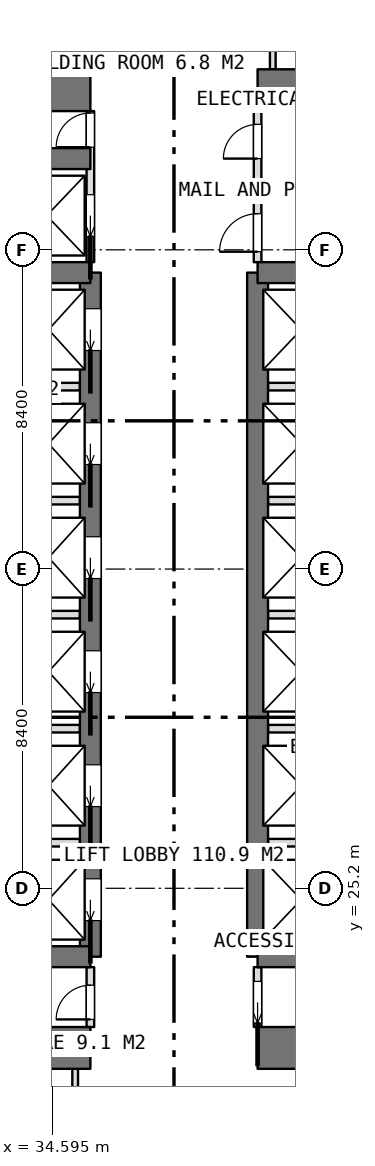
"""IFC4 building model, lengths in metres.
Left out: names, types, materials, properties, quantities, classifications, styles, units other than length and angle.
Written with IfcOpenShell. Run it as: python <this file> out.ifc"""

import sys

from ifc_helpers import new_model, si_unit, direction, frame, frame_2d, origin, place, context, subcontext, project, spatial, rectangle, extrude, element, fill, save


model = new_model("IFC4")
c1 = context("Model", 3, precision=1e-05, world=origin(), true_north=direction((0.0, 1.0)))
c2 = subcontext(c1, "Body", "Model", "MODEL_VIEW")
j1 = project(units=[si_unit("LENGTHUNIT", "METRE"), si_unit("PLANEANGLEUNIT", "RADIAN")], contexts=[c1])
p1 = place(None, origin())
s1 = spatial("IfcSite", under=j1, at=p1, CompositionType="ELEMENT")
p2 = place(p1, origin())
s2 = spatial("IfcBuilding", under=s1, at=p2, CompositionType="ELEMENT")
p3 = place(p2, frame((0.0, 0.0, 29.15)))
s3 = spatial("IfcBuildingStorey", under=s2, at=p3, CompositionType="ELEMENT", Elevation=29.15)
p4 = place(p3, frame((25.2, 21.0, 0.0), z_axis=(0.0, 0.0, 1.0), x_axis=(1.0, 0.0, 0.0)))
e1 = element("IfcWall", 1, at=p4, inside=s3, PredefinedType="SHEAR", context=c2, shape_type="SweptSolid", body=[
    extrude(rectangle(XDim=10.4, YDim=1.1, at=frame_2d((5.2, 0.0))), origin(), (0.0, 0.0, 1.0), 3.75),
])
p5 = place(p3, frame((40.0, 21.0, 0.0), z_axis=(0.0, 0.0, 1.0), x_axis=(1.0, 0.0, 0.0)))
e2 = element("IfcWall", 2, at=p5, inside=s3, PredefinedType="SHEAR", context=c2, shape_type="SweptSolid", body=[
    extrude(rectangle(XDim=10.4, YDim=1.1, at=frame_2d((5.2, 0.0))), origin(), (0.0, 0.0, 1.0), 3.75),
])
p6 = place(p3, frame((25.2, 46.2, 0.0), z_axis=(0.0, 0.0, 1.0), x_axis=(1.0, 0.0, 0.0)))
e3 = element("IfcWall", 3, at=p6, inside=s3, PredefinedType="SHEAR", context=c2, shape_type="SweptSolid", body=[
    extrude(rectangle(XDim=10.4, YDim=1.1, at=frame_2d((5.2, 0.0))), origin(), (0.0, 0.0, 1.0), 3.75),
])
p7 = place(p3, frame((40.0, 46.2, 0.0), z_axis=(0.0, 0.0, 1.0), x_axis=(1.0, 0.0, 0.0)))
e4 = element("IfcWall", 4, at=p7, inside=s3, PredefinedType="SHEAR", context=c2, shape_type="SweptSolid", body=[
    extrude(rectangle(XDim=10.4, YDim=1.1, at=frame_2d((5.2, 0.0))), origin(), (0.0, 0.0, 1.0), 3.75),
])
p8 = place(p3, frame((35.6, 23.4, 0.0), z_axis=(0.0, 0.0, 1.0), x_axis=(0.0, 1.0, 0.0)))
e5 = element("IfcWall", 5, at=p8, inside=s3, PredefinedType="SHEAR", context=c2, shape_type="SweptSolid", body=[
    extrude(rectangle(XDim=18.0, YDim=0.55, at=frame_2d((9.0, 0.0))), origin(), (0.0, 0.0, 1.0), 3.75),
])
p9 = place(p8, frame((0.95, 0.0, 0.0)))
e6 = element("IfcOpeningElement", 6, at=p9, cuts=e5, PredefinedType="OPENING", context=c2, shape_type="SweptSolid", body=[
    extrude(rectangle(XDim=1.1, YDim=2.1, at=frame_2d((0.55, 1.05))), frame((0.0, 0.285, 0.0), z_axis=(0.0, -1.0, 0.0), x_axis=(1.0, 0.0, 0.0)), (0.0, 0.0, 1.0), 0.57),
])
p10 = place(p8, frame((3.95, 0.0, 0.0)))
e7 = element("IfcOpeningElement", 7, at=p10, cuts=e5, PredefinedType="OPENING", context=c2, shape_type="SweptSolid", body=[
    extrude(rectangle(XDim=1.1, YDim=2.1, at=frame_2d((0.55, 1.05))), frame((0.0, 0.285, 0.0), z_axis=(0.0, -1.0, 0.0), x_axis=(1.0, 0.0, 0.0)), (0.0, 0.0, 1.0), 0.57),
])
p11 = place(p8, frame((6.95, 0.0, 0.0)))
e8 = element("IfcOpeningElement", 8, at=p11, cuts=e5, PredefinedType="OPENING", context=c2, shape_type="SweptSolid", body=[
    extrude(rectangle(XDim=1.1, YDim=2.1, at=frame_2d((0.55, 1.05))), frame((0.0, 0.285, 0.0), z_axis=(0.0, -1.0, 0.0), x_axis=(1.0, 0.0, 0.0)), (0.0, 0.0, 1.0), 0.57),
])
p12 = place(p8, frame((9.95, 0.0, 0.0)))
e9 = element("IfcOpeningElement", 9, at=p12, cuts=e5, PredefinedType="OPENING", context=c2, shape_type="SweptSolid", body=[
    extrude(rectangle(XDim=1.1, YDim=2.1, at=frame_2d((0.55, 1.05))), frame((0.0, 0.285, 0.0), z_axis=(0.0, -1.0, 0.0), x_axis=(1.0, 0.0, 0.0)), (0.0, 0.0, 1.0), 0.57),
])
p13 = place(p8, frame((12.95, 0.0, 0.0)))
e10 = element("IfcOpeningElement", 10, at=p13, cuts=e5, PredefinedType="OPENING", context=c2, shape_type="SweptSolid", body=[
    extrude(rectangle(XDim=1.1, YDim=2.1, at=frame_2d((0.55, 1.05))), frame((0.0, 0.285, 0.0), z_axis=(0.0, -1.0, 0.0), x_axis=(1.0, 0.0, 0.0)), (0.0, 0.0, 1.0), 0.57),
])
p14 = place(p8, frame((15.95, 0.0, 0.0)))
e11 = element("IfcOpeningElement", 11, at=p14, cuts=e5, PredefinedType="OPENING", context=c2, shape_type="SweptSolid", body=[
    extrude(rectangle(XDim=1.1, YDim=2.1, at=frame_2d((0.55, 1.05))), frame((0.0, 0.285, 0.0), z_axis=(0.0, -1.0, 0.0), x_axis=(1.0, 0.0, 0.0)), (0.0, 0.0, 1.0), 0.57),
])
p15 = place(p3, frame((40.0, 23.4, 0.0), z_axis=(0.0, 0.0, 1.0), x_axis=(0.0, 1.0, 0.0)))
e12 = element("IfcWall", 12, at=p15, inside=s3, PredefinedType="SHEAR", context=c2, shape_type="SweptSolid", body=[
    extrude(rectangle(XDim=18.0, YDim=0.55, at=frame_2d((9.0, 0.0))), origin(), (0.0, 0.0, 1.0), 3.75),
])
for number, where, z_axis, x_axis in (
    (13, (31.8, 23.4, 0.0), (0.0, 0.0, 1.0), (1.0, 0.0, 0.0)),
    (14, (31.8, 41.4, 0.0), (0.0, 0.0, 1.0), (1.0, 0.0, 0.0)),
    (15, (31.8, 44.4, 0.0), (0.0, 0.0, 1.0), (1.0, 0.0, 0.0)),
    (16, (40.0, 23.4, 0.0), (0.0, 0.0, 1.0), (1.0, 0.0, 0.0)),
    (17, (40.0, 41.4, 0.0), (0.0, 0.0, 1.0), (1.0, 0.0, 0.0)),
):
    element("IfcWall", number, at=place(p3, frame(where, z_axis=z_axis, x_axis=x_axis)), inside=s3, PredefinedType="SHEAR", context=c2, shape_type="SweptSolid", body=[
        extrude(rectangle(XDim=3.8, YDim=0.55, at=frame_2d((1.9, 0.0))), origin(), (0.0, 0.0, 1.0), 3.75),
    ])
for number, where, z_axis, x_axis in (
    (18, (32.075, 26.4, 0.0), (0.0, 0.0, 1.0), (1.0, 0.0, 0.0)),
    (19, (32.075, 29.4, 0.0), (0.0, 0.0, 1.0), (1.0, 0.0, 0.0)),
    (20, (32.075, 32.4, 0.0), (0.0, 0.0, 1.0), (1.0, 0.0, 0.0)),
    (21, (32.075, 35.4, 0.0), (0.0, 0.0, 1.0), (1.0, 0.0, 0.0)),
    (22, (32.075, 38.4, 0.0), (0.0, 0.0, 1.0), (1.0, 0.0, 0.0)),
    (23, (40.275, 26.4, 0.0), (0.0, 0.0, 1.0), (1.0, 0.0, 0.0)),
    (24, (40.275, 29.4, 0.0), (0.0, 0.0, 1.0), (1.0, 0.0, 0.0)),
    (25, (40.275, 32.4, 0.0), (0.0, 0.0, 1.0), (1.0, 0.0, 0.0)),
    (26, (40.275, 35.4, 0.0), (0.0, 0.0, 1.0), (1.0, 0.0, 0.0)),
    (27, (40.275, 38.4, 0.0), (0.0, 0.0, 1.0), (1.0, 0.0, 0.0)),
):
    element("IfcWall", number, at=place(p3, frame(where, z_axis=z_axis, x_axis=x_axis)), inside=s3, PredefinedType="PARTITIONING", context=c2, shape_type="SweptSolid", body=[
        extrude(rectangle(XDim=3.25, YDim=0.2, at=frame_2d((1.625, 0.0))), origin(), (0.0, 0.0, 1.0), 3.5),
    ])
p16 = place(p3, frame((40.0, 21.55, 0.0), z_axis=(0.0, 0.0, 1.0), x_axis=(0.0, 1.0, 0.0)))
e28 = element("IfcWall", 28, at=p16, inside=s3, PredefinedType="PARTITIONING", context=c2, shape_type="SweptSolid", body=[
    extrude(rectangle(XDim=1.575, YDim=0.2, at=frame_2d((0.788, 0.0))), origin(), (0.0, 0.0, 1.0), 3.5),
])
p17 = place(p16, frame((0.1, 0.0, 0.0)))
e29 = element("IfcOpeningElement", 29, at=p17, cuts=e28, PredefinedType="OPENING", context=c2, shape_type="SweptSolid", body=[
    extrude(rectangle(XDim=1.1, YDim=2.1, at=frame_2d((0.55, 1.05))), frame((0.0, 0.11, 0.0), z_axis=(0.0, -1.0, 0.0), x_axis=(1.0, 0.0, 0.0)), (0.0, 0.0, 1.0), 0.22),
])
p18 = place(p3, frame((40.0, 41.675, 0.0), z_axis=(0.0, 0.0, 1.0), x_axis=(0.0, 1.0, 0.0)))
e30 = element("IfcWall", 30, at=p18, inside=s3, PredefinedType="PARTITIONING", context=c2, shape_type="SweptSolid", body=[
    extrude(rectangle(XDim=3.975, YDim=0.2, at=frame_2d((1.987, 0.0))), origin(), (0.0, 0.0, 1.0), 3.5),
])
p19 = place(p18, frame((2.725, 0.0, 0.0)))
e31 = element("IfcOpeningElement", 31, at=p19, cuts=e30, PredefinedType="OPENING", context=c2, shape_type="SweptSolid", body=[
    extrude(rectangle(XDim=0.9, YDim=2.1, at=frame_2d((0.45, 1.05))), frame((0.0, 0.11, 0.0), z_axis=(0.0, -1.0, 0.0), x_axis=(1.0, 0.0, 0.0)), (0.0, 0.0, 1.0), 0.22),
])
p20 = place(p18, frame((0.275, 0.0, 0.0)))
e32 = element("IfcOpeningElement", 32, at=p20, cuts=e30, PredefinedType="OPENING", context=c2, shape_type="SweptSolid", body=[
    extrude(rectangle(XDim=1.0, YDim=2.1, at=frame_2d((0.5, 1.05))), frame((0.0, 0.11, 0.0), z_axis=(0.0, -1.0, 0.0), x_axis=(1.0, 0.0, 0.0)), (0.0, 0.0, 1.0), 0.22),
])
p21 = place(p3, frame((35.6, 41.675, 0.0), z_axis=(0.0, 0.0, 1.0), x_axis=(0.0, 1.0, 0.0)))
e33 = element("IfcWall", 33, at=p21, inside=s3, PredefinedType="PARTITIONING", context=c2, shape_type="SweptSolid", body=[
    extrude(rectangle(XDim=3.975, YDim=0.2, at=frame_2d((1.987, 0.0))), origin(), (0.0, 0.0, 1.0), 3.5),
])
p22 = place(p21, frame((3.025, 0.0, 0.0)))
e34 = element("IfcOpeningElement", 34, at=p22, cuts=e33, PredefinedType="OPENING", context=c2, shape_type="SweptSolid", body=[
    extrude(rectangle(XDim=0.9, YDim=2.1, at=frame_2d((0.45, 1.05))), frame((0.0, 0.11, 0.0), z_axis=(0.0, -1.0, 0.0), x_axis=(1.0, 0.0, 0.0)), (0.0, 0.0, 1.0), 0.22),
])
p23 = place(p21, frame((0.675, 0.0, 0.0)))
e35 = element("IfcOpeningElement", 35, at=p23, cuts=e33, PredefinedType="OPENING", context=c2, shape_type="SweptSolid", body=[
    extrude(rectangle(XDim=1.1, YDim=2.1, at=frame_2d((0.55, 1.05))), frame((0.0, 0.11, 0.0), z_axis=(0.0, -1.0, 0.0), x_axis=(1.0, 0.0, 0.0)), (0.0, 0.0, 1.0), 0.22),
])
p24 = place(p3, frame((35.6, 21.55, 0.0), z_axis=(0.0, 0.0, 1.0), x_axis=(0.0, 1.0, 0.0)))
e36 = element("IfcWall", 36, at=p24, inside=s3, PredefinedType="PARTITIONING", context=c2, shape_type="SweptSolid", body=[
    extrude(rectangle(XDim=1.575, YDim=0.2, at=frame_2d((0.788, 0.0))), origin(), (0.0, 0.0, 1.0), 3.5),
])
p25 = place(p24, frame((0.2, 0.0, 0.0)))
e37 = element("IfcOpeningElement", 37, at=p25, cuts=e36, PredefinedType="OPENING", context=c2, shape_type="SweptSolid", body=[
    extrude(rectangle(XDim=0.9, YDim=2.1, at=frame_2d((0.45, 1.05))), frame((0.0, 0.11, 0.0), z_axis=(0.0, -1.0, 0.0), x_axis=(1.0, 0.0, 0.0)), (0.0, 0.0, 1.0), 0.22),
])
p26 = place(p3, frame((40.0, 43.5, 0.0), z_axis=(0.0, 0.0, 1.0), x_axis=(1.0, 0.0, 0.0)))
e38 = element("IfcWall", 38, at=p26, inside=s3, PredefinedType="PARTITIONING", context=c2, shape_type="SweptSolid", body=[
    extrude(rectangle(XDim=3.525, YDim=0.2, at=frame_2d((1.762, 0.0))), origin(), (0.0, 0.0, 1.0), 3.5),
])
for number, where, z_axis, x_axis in (
    (39, (40.4, 46.75, 0.0), (0.0, 0.0, 1.0), (0.0, 1.0, 0.0)),
    (40, (35.2, 46.75, 0.0), (0.0, 0.0, 1.0), (0.0, 1.0, 0.0)),
    (41, (35.2, 17.875, 0.0), (0.0, 0.0, 1.0), (0.0, 1.0, 0.0)),
):
    element("IfcWall", number, at=place(p3, frame(where, z_axis=z_axis, x_axis=x_axis)), inside=s3, PredefinedType="PARTITIONING", context=c2, shape_type="SweptSolid", body=[
        extrude(rectangle(XDim=2.575, YDim=0.15, at=frame_2d((1.288, 0.0))), origin(), (0.0, 0.0, 1.0), 3.5),
    ])
p27 = place(p17, origin())
e42 = element("IfcDoor", 42, at=p27, inside=s3, OperationType="SLIDING_TO_LEFT", PredefinedType="DOOR", context=c2, shape_type="SweptSolid", body=[
    extrude(rectangle(XDim=1.1, YDim=2.1, at=frame_2d((0.55, 1.05))), frame((0.0, 0.025, 0.0), z_axis=(0.0, -1.0, 0.0), x_axis=(1.0, 0.0, 0.0)), (0.0, 0.0, 1.0), 0.05),
])
fill(e29, e42)
p28 = place(p25, origin())
e43 = element("IfcDoor", 43, at=p28, inside=s3, OperationType="SINGLE_SWING_LEFT", PredefinedType="DOOR", context=c2, shape_type="SweptSolid", body=[
    extrude(rectangle(XDim=0.9, YDim=2.1, at=frame_2d((0.45, 1.05))), frame((0.0, 0.025, 0.0), z_axis=(0.0, -1.0, 0.0), x_axis=(1.0, 0.0, 0.0)), (0.0, 0.0, 1.0), 0.05),
])
fill(e37, e43)
p29 = place(p19, origin())
e44 = element("IfcDoor", 44, at=p29, inside=s3, OperationType="SINGLE_SWING_LEFT", PredefinedType="DOOR", context=c2, shape_type="SweptSolid", body=[
    extrude(rectangle(XDim=0.9, YDim=2.1, at=frame_2d((0.45, 1.05))), frame((0.0, 0.025, 0.0), z_axis=(0.0, -1.0, 0.0), x_axis=(1.0, 0.0, 0.0)), (0.0, 0.0, 1.0), 0.05),
])
fill(e31, e44)
p30 = place(p20, origin())
e45 = element("IfcDoor", 45, at=p30, inside=s3, OperationType="SINGLE_SWING_LEFT", PredefinedType="DOOR", context=c2, shape_type="SweptSolid", body=[
    extrude(rectangle(XDim=1.0, YDim=2.1, at=frame_2d((0.5, 1.05))), frame((0.0, 0.025, 0.0), z_axis=(0.0, -1.0, 0.0), x_axis=(1.0, 0.0, 0.0)), (0.0, 0.0, 1.0), 0.05),
])
fill(e32, e45)
p31 = place(p22, origin())
e46 = element("IfcDoor", 46, at=p31, inside=s3, OperationType="SINGLE_SWING_LEFT", PredefinedType="DOOR", context=c2, shape_type="SweptSolid", body=[
    extrude(rectangle(XDim=0.9, YDim=2.1, at=frame_2d((0.45, 1.05))), frame((0.0, 0.025, 0.0), z_axis=(0.0, -1.0, 0.0), x_axis=(1.0, 0.0, 0.0)), (0.0, 0.0, 1.0), 0.05),
])
fill(e34, e46)
p32 = place(p9, origin())
e47 = element("IfcDoor", 47, at=p32, inside=s3, OperationType="SLIDING_TO_LEFT", PredefinedType="USERDEFINED", context=c2, shape_type="SweptSolid", body=[
    extrude(rectangle(XDim=1.1, YDim=2.1, at=frame_2d((0.55, 1.05))), frame((0.0, 0.025, 0.0), z_axis=(0.0, -1.0, 0.0), x_axis=(1.0, 0.0, 0.0)), (0.0, 0.0, 1.0), 0.05),
])
fill(e6, e47)
p33 = place(p10, origin())
e48 = element("IfcDoor", 48, at=p33, inside=s3, OperationType="SLIDING_TO_LEFT", PredefinedType="USERDEFINED", context=c2, shape_type="SweptSolid", body=[
    extrude(rectangle(XDim=1.1, YDim=2.1, at=frame_2d((0.55, 1.05))), frame((0.0, 0.025, 0.0), z_axis=(0.0, -1.0, 0.0), x_axis=(1.0, 0.0, 0.0)), (0.0, 0.0, 1.0), 0.05),
])
fill(e7, e48)
p34 = place(p11, origin())
e49 = element("IfcDoor", 49, at=p34, inside=s3, OperationType="SLIDING_TO_LEFT", PredefinedType="USERDEFINED", context=c2, shape_type="SweptSolid", body=[
    extrude(rectangle(XDim=1.1, YDim=2.1, at=frame_2d((0.55, 1.05))), frame((0.0, 0.025, 0.0), z_axis=(0.0, -1.0, 0.0), x_axis=(1.0, 0.0, 0.0)), (0.0, 0.0, 1.0), 0.05),
])
fill(e8, e49)
p35 = place(p12, origin())
e50 = element("IfcDoor", 50, at=p35, inside=s3, OperationType="SLIDING_TO_LEFT", PredefinedType="USERDEFINED", context=c2, shape_type="SweptSolid", body=[
    extrude(rectangle(XDim=1.1, YDim=2.1, at=frame_2d((0.55, 1.05))), frame((0.0, 0.025, 0.0), z_axis=(0.0, -1.0, 0.0), x_axis=(1.0, 0.0, 0.0)), (0.0, 0.0, 1.0), 0.05),
])
fill(e9, e50)
p36 = place(p13, origin())
e51 = element("IfcDoor", 51, at=p36, inside=s3, OperationType="SLIDING_TO_LEFT", PredefinedType="USERDEFINED", context=c2, shape_type="SweptSolid", body=[
    extrude(rectangle(XDim=1.1, YDim=2.1, at=frame_2d((0.55, 1.05))), frame((0.0, 0.025, 0.0), z_axis=(0.0, -1.0, 0.0), x_axis=(1.0, 0.0, 0.0)), (0.0, 0.0, 1.0), 0.05),
])
fill(e10, e51)
p37 = place(p14, origin())
e52 = element("IfcDoor", 52, at=p37, inside=s3, OperationType="SLIDING_TO_LEFT", PredefinedType="USERDEFINED", context=c2, shape_type="SweptSolid", body=[
    extrude(rectangle(XDim=1.1, YDim=2.1, at=frame_2d((0.55, 1.05))), frame((0.0, 0.025, 0.0), z_axis=(0.0, -1.0, 0.0), x_axis=(1.0, 0.0, 0.0)), (0.0, 0.0, 1.0), 0.05),
])
fill(e11, e52)
p38 = place(p23, origin())
e53 = element("IfcDoor", 53, at=p38, inside=s3, OperationType="SLIDING_TO_LEFT", PredefinedType="USERDEFINED", context=c2, shape_type="SweptSolid", body=[
    extrude(rectangle(XDim=1.1, YDim=2.1, at=frame_2d((0.55, 1.05))), frame((0.0, 0.025, 0.0), z_axis=(0.0, -1.0, 0.0), x_axis=(1.0, 0.0, 0.0)), (0.0, 0.0, 1.0), 0.05),
])
fill(e35, e53)
save(model, sys.argv[1])
